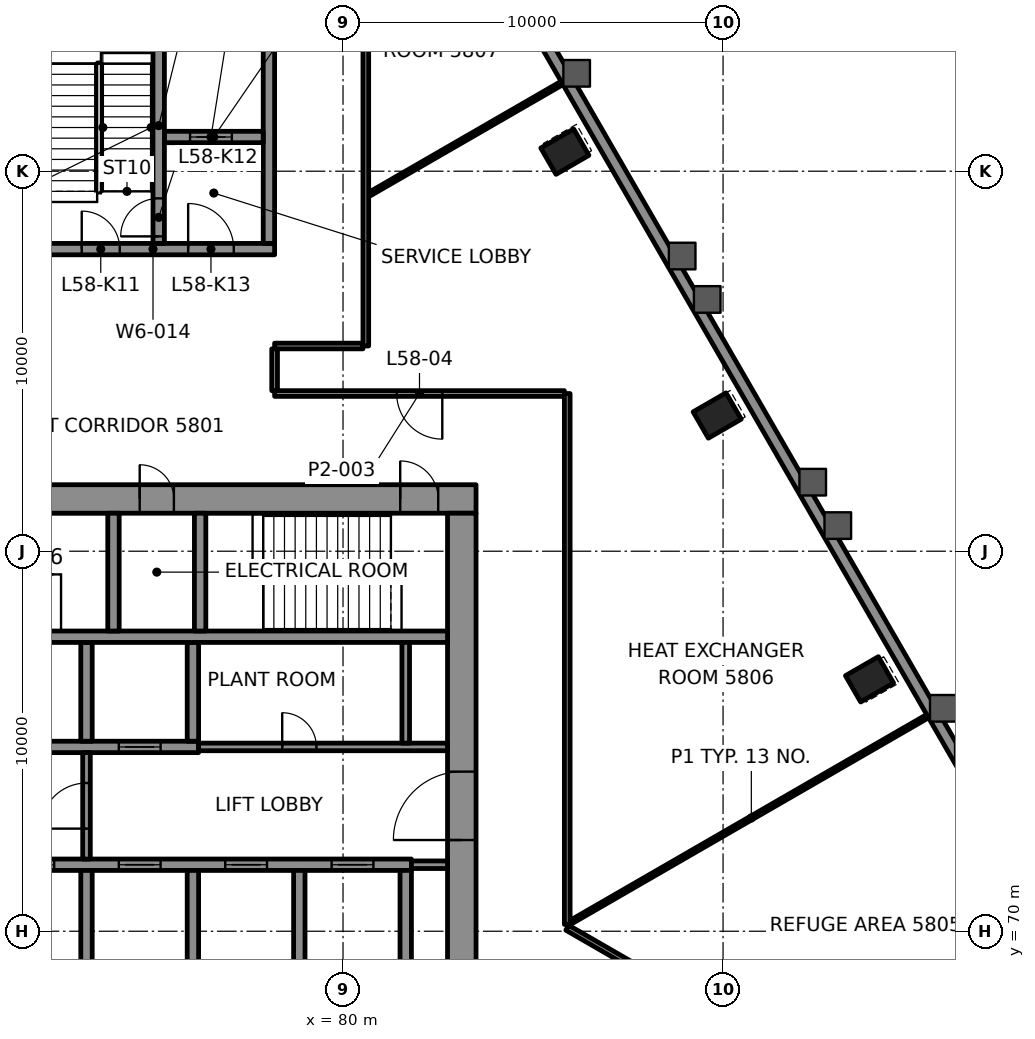
"""IFC4 building model, lengths in metres.
Left out: names, types, materials, properties, quantities, classifications, styles, units other than length and angle.
Written with IfcOpenShell. Run it as: python <this file> out.ifc"""

import sys

from ifc_helpers import new_model, si_unit, direction, frame, frame_2d, origin, origin_2d, place, context, subcontext, project, spatial, rectangle, hollow_rectangle, extrude, element, fill, save


model = new_model("IFC4")
c1 = context("Model", 3, precision=1e-05, world=origin(), true_north=direction((0.0, 1.0)))
c2 = subcontext(c1, "Body", "Model", "MODEL_VIEW")
j1 = project(units=[si_unit("LENGTHUNIT", "METRE"), si_unit("PLANEANGLEUNIT", "RADIAN")], contexts=[c1])
p1 = place(None, origin())
s1 = spatial("IfcSite", under=j1, at=p1, CompositionType="ELEMENT")
p2 = place(p1, origin())
s2 = spatial("IfcBuilding", under=s1, at=p2, CompositionType="ELEMENT")
p3 = place(p2, frame((0.0, 0.0, 247.6)))
s3 = spatial("IfcBuildingStorey", under=s2, at=p3, CompositionType="ELEMENT", Elevation=247.6)
for number, where, z_axis, x_axis in (
    (1, (93.854, 76.628, -0.0), (0.0, 0.0, 1.0), (-0.5, 0.866, 0.0)),
    (2, (89.845, 83.571, -0.0), (0.0, 0.0, 1.0), (-0.5, 0.866, 0.0)),
    (3, (85.837, 90.514, -0.0), (0.0, 0.0, 1.0), (-0.5, 0.866, 0.0)),
):
    element("IfcColumn", number, at=place(p3, frame(where, z_axis=z_axis, x_axis=x_axis)), inside=s3, PredefinedType="COLUMN", context=c2, shape_type="SweptSolid", body=[
        extrude(hollow_rectangle(XDim=0.8, YDim=1.0, WallThickness=0.05, at=origin_2d()), origin(), (0.0, 0.0, 1.0), 4.5),
    ])
p4 = place(p3, frame((66.5, 81.375, 0.0), z_axis=(0.0, 0.0, 1.0), x_axis=(1.0, 0.0, 0.0)))
e4 = element("IfcWall", 4, at=p4, inside=s3, PredefinedType="SHEAR", context=c2, shape_type="SweptSolid", body=[
    extrude(rectangle(XDim=17.0, YDim=0.75, at=frame_2d((8.5, 0.0))), origin(), (0.0, 0.0, 1.0), 4.05),
])
p5 = place(p4, frame((1.195, 0.0, 0.0)))
e5 = element("IfcOpeningElement", 5, at=p5, cuts=e4, PredefinedType="OPENING", context=c2, shape_type="SweptSolid", body=[
    extrude(rectangle(XDim=1.0, YDim=2.1, at=frame_2d((0.5, 1.05))), frame((0.0, 0.385, 0.0), z_axis=(0.0, -1.0, 0.0), x_axis=(1.0, 0.0, 0.0)), (0.0, 0.0, 1.0), 0.77),
])
p6 = place(p4, frame((15.005, 0.0, 0.0)))
e6 = element("IfcOpeningElement", 6, at=p6, cuts=e4, PredefinedType="OPENING", context=c2, shape_type="SweptSolid", body=[
    extrude(rectangle(XDim=1.0, YDim=2.1, at=frame_2d((0.5, 1.05))), frame((0.0, 0.385, 0.0), z_axis=(0.0, -1.0, 0.0), x_axis=(1.0, 0.0, 0.0)), (0.0, 0.0, 1.0), 0.77),
])
p7 = place(p4, frame((8.15, 0.0, 0.0)))
e7 = element("IfcOpeningElement", 7, at=p7, cuts=e4, PredefinedType="OPENING", context=c2, shape_type="SweptSolid", body=[
    extrude(rectangle(XDim=0.9, YDim=2.1, at=frame_2d((0.45, 1.05))), frame((0.0, 0.385, 0.0), z_axis=(0.0, -1.0, 0.0), x_axis=(1.0, 0.0, 0.0)), (0.0, 0.0, 1.0), 0.77),
])
p8 = place(p3, frame((83.125, 69.0, 0.0), z_axis=(0.0, 0.0, 1.0), x_axis=(0.0, 1.0, 0.0)))
e8 = element("IfcWall", 8, at=p8, inside=s3, PredefinedType="SHEAR", context=c2, shape_type="SweptSolid", body=[
    extrude(rectangle(XDim=12.0, YDim=0.75, at=frame_2d((6.0, 0.0))), origin(), (0.0, 0.0, 1.0), 4.05),
])
p9 = place(p8, frame((3.4, 0.0, 0.0)))
e9 = element("IfcOpeningElement", 9, at=p9, cuts=e8, PredefinedType="OPENING", context=c2, shape_type="SweptSolid", body=[
    extrude(rectangle(XDim=1.8, YDim=2.1, at=frame_2d((0.9, 1.05))), frame((0.0, 0.385, 0.0), z_axis=(0.0, -1.0, 0.0), x_axis=(1.0, 0.0, 0.0)), (0.0, 0.0, 1.0), 0.77),
])
p10 = place(p3, frame((70.3, 71.75, 0.0), z_axis=(0.0, 0.0, 1.0), x_axis=(1.0, 0.0, 0.0)))
e10 = element("IfcWall", 10, at=p10, inside=s3, PredefinedType="SHEAR", context=c2, shape_type="SweptSolid", body=[
    extrude(rectangle(XDim=11.5, YDim=0.3, at=frame_2d((5.75, 0.0))), origin(), (0.0, 0.0, 1.0), 4.05),
])
p11 = place(p10, frame((1.0, 0.0, 0.0)))
e11 = element("IfcOpeningElement", 11, at=p11, cuts=e10, PredefinedType="OPENING", context=c2, shape_type="SweptSolid", body=[
    extrude(rectangle(XDim=1.1, YDim=2.1, at=frame_2d((0.55, 1.05))), frame((0.0, 0.16, 0.0), z_axis=(0.0, -1.0, 0.0), x_axis=(1.0, 0.0, 0.0)), (0.0, 0.0, 1.0), 0.32),
])
p12 = place(p10, frame((3.8, 0.0, 0.0)))
e12 = element("IfcOpeningElement", 12, at=p12, cuts=e10, PredefinedType="OPENING", context=c2, shape_type="SweptSolid", body=[
    extrude(rectangle(XDim=1.1, YDim=2.1, at=frame_2d((0.55, 1.05))), frame((0.0, 0.16, 0.0), z_axis=(0.0, -1.0, 0.0), x_axis=(1.0, 0.0, 0.0)), (0.0, 0.0, 1.0), 0.32),
])
p13 = place(p10, frame((6.6, 0.0, 0.0)))
e13 = element("IfcOpeningElement", 13, at=p13, cuts=e10, PredefinedType="OPENING", context=c2, shape_type="SweptSolid", body=[
    extrude(rectangle(XDim=1.1, YDim=2.1, at=frame_2d((0.55, 1.05))), frame((0.0, 0.16, 0.0), z_axis=(0.0, -1.0, 0.0), x_axis=(1.0, 0.0, 0.0)), (0.0, 0.0, 1.0), 0.32),
])
p14 = place(p10, frame((9.4, 0.0, 0.0)))
e14 = element("IfcOpeningElement", 14, at=p14, cuts=e10, PredefinedType="OPENING", context=c2, shape_type="SweptSolid", body=[
    extrude(rectangle(XDim=1.1, YDim=2.1, at=frame_2d((0.55, 1.05))), frame((0.0, 0.16, 0.0), z_axis=(0.0, -1.0, 0.0), x_axis=(1.0, 0.0, 0.0)), (0.0, 0.0, 1.0), 0.32),
])
p15 = place(p3, frame((70.3, 74.85, 0.0), z_axis=(0.0, 0.0, 1.0), x_axis=(1.0, 0.0, 0.0)))
e15 = element("IfcWall", 15, at=p15, inside=s3, PredefinedType="SHEAR", context=c2, shape_type="SweptSolid", body=[
    extrude(rectangle(XDim=5.9, YDim=0.3, at=frame_2d((2.95, 0.0))), origin(), (0.0, 0.0, 1.0), 4.05),
])
p16 = place(p15, frame((3.8, 0.0, 0.0)))
e16 = element("IfcOpeningElement", 16, at=p16, cuts=e15, PredefinedType="OPENING", context=c2, shape_type="SweptSolid", body=[
    extrude(rectangle(XDim=1.1, YDim=2.1, at=frame_2d((0.55, 1.05))), frame((0.0, 0.16, 0.0), z_axis=(0.0, -1.0, 0.0), x_axis=(1.0, 0.0, 0.0)), (0.0, 0.0, 1.0), 0.32),
])
for number, where, z_axis, x_axis in (
    (17, (73.25, 69.0, 0.0), (0.0, 0.0, 1.0), (0.0, 1.0, 0.0)),
    (18, (73.25, 75.0, 0.0), (0.0, 0.0, 1.0), (0.0, 1.0, 0.0)),
    (19, (76.05, 69.0, 0.0), (0.0, 0.0, 1.0), (0.0, 1.0, 0.0)),
    (20, (76.05, 75.0, 0.0), (0.0, 0.0, 1.0), (0.0, 1.0, 0.0)),
    (21, (78.85, 69.0, 0.0), (0.0, 0.0, 1.0), (0.0, 1.0, 0.0)),
    (22, (81.65, 69.0, 0.0), (0.0, 0.0, 1.0), (0.0, 1.0, 0.0)),
):
    element("IfcWall", number, at=place(p3, frame(where, z_axis=z_axis, x_axis=x_axis)), inside=s3, PredefinedType="SHEAR", context=c2, shape_type="SweptSolid", body=[
        extrude(rectangle(XDim=2.6, YDim=0.3, at=frame_2d((1.3, 0.0))), origin(), (0.0, 0.0, 1.0), 4.05),
    ])
p17 = place(p3, frame((67.25, 77.75, 0.0), z_axis=(0.0, 0.0, 1.0), x_axis=(1.0, 0.0, 0.0)))
e23 = element("IfcWall", 23, at=p17, inside=s3, PredefinedType="SHEAR", context=c2, shape_type="SweptSolid", body=[
    extrude(rectangle(XDim=15.5, YDim=0.3, at=frame_2d((7.75, 0.0))), origin(), (0.0, 0.0, 1.0), 4.05),
])
p18 = place(p17, frame((0.445, 0.0, 0.0)))
e24 = element("IfcOpeningElement", 24, at=p18, cuts=e23, PredefinedType="OPENING", context=c2, shape_type="SweptSolid", body=[
    extrude(rectangle(XDim=1.0, YDim=2.1, at=frame_2d((0.5, 1.05))), frame((0.0, 0.16, 0.0), z_axis=(0.0, -1.0, 0.0), x_axis=(1.0, 0.0, 0.0)), (0.0, 0.0, 1.0), 0.32),
])
for number, where, z_axis, x_axis in (
    (25, (73.96, 77.9, 0.0), (0.0, 0.0, 1.0), (0.0, 1.0, 0.0)),
    (26, (76.24, 77.9, 0.0), (0.0, 0.0, 1.0), (0.0, 1.0, 0.0)),
):
    element("IfcWall", number, at=place(p3, frame(where, z_axis=z_axis, x_axis=x_axis)), inside=s3, PredefinedType="SHEAR", context=c2, shape_type="SweptSolid", body=[
        extrude(rectangle(XDim=3.1, YDim=0.3, at=frame_2d((1.55, 0.0))), origin(), (0.0, 0.0, 1.0), 4.05),
    ])
p19 = place(p3, frame((71.8, 87.95, 0.0), z_axis=(0.0, 0.0, 1.0), x_axis=(1.0, 0.0, 0.0)))
e27 = element("IfcWall", 27, at=p19, inside=s3, PredefinedType="SHEAR", context=c2, shape_type="SweptSolid", body=[
    extrude(rectangle(XDim=6.4, YDim=0.3, at=frame_2d((3.2, 0.0))), origin(), (0.0, 0.0, 1.0), 4.05),
])
p20 = place(p19, frame((1.325, 0.0, 0.0)))
e28 = element("IfcOpeningElement", 28, at=p20, cuts=e27, PredefinedType="OPENING", context=c2, shape_type="SweptSolid", body=[
    extrude(rectangle(XDim=1.0, YDim=2.1, at=frame_2d((0.5, 1.05))), frame((0.0, 0.16, 0.0), z_axis=(0.0, -1.0, 0.0), x_axis=(1.0, 0.0, 0.0)), (0.0, 0.0, 1.0), 0.32),
])
p21 = place(p19, frame((4.125, 0.0, 0.0)))
e29 = element("IfcOpeningElement", 29, at=p21, cuts=e27, PredefinedType="OPENING", context=c2, shape_type="SweptSolid", body=[
    extrude(rectangle(XDim=1.2, YDim=2.1, at=frame_2d((0.6, 1.05))), frame((0.0, 0.16, 0.0), z_axis=(0.0, -1.0, 0.0), x_axis=(1.0, 0.0, 0.0)), (0.0, 0.0, 1.0), 0.32),
])
p22 = place(p3, frame((78.05, 88.1, 0.0), z_axis=(0.0, 0.0, 1.0), x_axis=(0.0, 1.0, 0.0)))
e30 = element("IfcWall", 30, at=p22, inside=s3, PredefinedType="SHEAR", context=c2, shape_type="SweptSolid", body=[
    extrude(rectangle(XDim=6.2, YDim=0.3, at=frame_2d((3.1, 0.0))), origin(), (0.0, 0.0, 1.0), 4.05),
])
p23 = place(p3, frame((75.3, 90.9, 0.0), z_axis=(0.0, 0.0, 1.0), x_axis=(1.0, 0.0, 0.0)))
e31 = element("IfcWall", 31, at=p23, inside=s3, PredefinedType="SHEAR", context=c2, shape_type="SweptSolid", body=[
    extrude(rectangle(XDim=2.6, YDim=0.3, at=frame_2d((1.3, 0.0))), origin(), (0.0, 0.0, 1.0), 4.05),
])
p24 = place(p23, frame((0.675, 0.0, 0.0)))
e32 = element("IfcOpeningElement", 32, at=p24, cuts=e31, PredefinedType="OPENING", context=c2, shape_type="SweptSolid", body=[
    extrude(rectangle(XDim=1.1, YDim=2.1, at=frame_2d((0.55, 1.05))), frame((0.0, 0.16, 0.0), z_axis=(0.0, -1.0, 0.0), x_axis=(1.0, 0.0, 0.0)), (0.0, 0.0, 1.0), 0.32),
])
p25 = place(p3, frame((75.15, 88.1, 0.0), z_axis=(0.0, 0.0, 1.0), x_axis=(0.0, 1.0, 0.0)))
e33 = element("IfcWall", 33, at=p25, inside=s3, PredefinedType="SHEAR", context=c2, shape_type="SweptSolid", body=[
    extrude(rectangle(XDim=6.2, YDim=0.3, at=frame_2d((3.1, 0.0))), origin(), (0.0, 0.0, 1.0), 4.05),
])
p26 = place(p25, frame((0.185, 0.0, 0.0)))
e34 = element("IfcOpeningElement", 34, at=p26, cuts=e33, PredefinedType="OPENING", context=c2, shape_type="SweptSolid", body=[
    extrude(rectangle(XDim=1.0, YDim=2.1, at=frame_2d((0.5, 1.05))), frame((0.0, 0.16, 0.0), z_axis=(0.0, -1.0, 0.0), x_axis=(1.0, 0.0, 0.0)), (0.0, 0.0, 1.0), 0.32),
])
p27 = place(p3, frame((85.824, 84.15, 0.0), z_axis=(0.0, 0.0, 1.0), x_axis=(-1.0, 0.0, 0.0)))
e35 = element("IfcWall", 35, at=p27, inside=s3, PredefinedType="PARTITIONING", context=c2, shape_type="SweptSolid", body=[
    extrude(rectangle(XDim=7.625, YDim=0.15, at=frame_2d((3.812, 0.0))), origin(), (0.0, 0.0, 1.0), 3.447),
])
p28 = place(p27, frame((3.212, 0.0, 0.0)))
e36 = element("IfcOpeningElement", 36, at=p28, cuts=e35, PredefinedType="OPENING", context=c2, shape_type="SweptSolid", body=[
    extrude(rectangle(XDim=1.2, YDim=2.1, at=frame_2d((0.6, 1.05))), frame((0.0, 0.085, 0.0), z_axis=(0.0, -1.0, 0.0), x_axis=(1.0, 0.0, 0.0)), (0.0, 0.0, 1.0), 0.17),
])
p29 = place(p3, frame((78.2, 85.4, 0.0), z_axis=(0.0, 0.0, 1.0), x_axis=(1.0, 0.0, 0.0)))
e37 = element("IfcWall", 37, at=p29, inside=s3, PredefinedType="PARTITIONING", context=c2, shape_type="SweptSolid", body=[
    extrude(rectangle(XDim=2.324, YDim=0.15, at=frame_2d((1.162, 0.0))), origin(), (0.0, 0.0, 1.0), 3.447),
])
p30 = place(p3, frame((86.001, 70.243, 0.0), z_axis=(0.0, 0.0, 1.0), x_axis=(0.866028949349, 0.499993858851, 0.0)))
e38 = element("IfcWall", 38, at=p30, inside=s3, PredefinedType="PARTITIONING", context=c2, shape_type="SweptSolid", body=[
    extrude(rectangle(XDim=10.953, YDim=0.1, at=frame_2d((5.477, 0.0))), origin(), (0.0, 0.0, 1.0), 3.372),
])
p31 = place(p3, frame((80.701, 89.4, 0.0), z_axis=(0.0, 0.0, 1.0), x_axis=(0.866020648857, 0.500008235685, 0.0)))
e39 = element("IfcWall", 39, at=p31, inside=s3, PredefinedType="PARTITIONING", context=c2, shape_type="SweptSolid", body=[
    extrude(rectangle(XDim=5.965, YDim=0.1, at=frame_2d((2.983, 0.0))), origin(), (0.0, 0.0, 1.0), 3.372),
])
p32 = place(p3, frame((85.9, 70.179, 0.0), z_axis=(0.0, 0.0, 1.0), x_axis=(0.0, 1.0, 0.0)))
e40 = element("IfcWall", 40, at=p32, inside=s3, PredefinedType="PARTITIONING", context=c2, shape_type="SweptSolid", body=[
    extrude(rectangle(XDim=13.97, YDim=0.15, at=frame_2d((6.985, 0.0))), origin(), (0.0, 0.0, 1.0), 3.45),
])
p33 = place(p3, frame((80.6, 85.401, 0.0), z_axis=(0.0, 0.0, 1.0), x_axis=(0.0, 1.0, 0.0)))
e41 = element("IfcWall", 41, at=p33, inside=s3, PredefinedType="PARTITIONING", context=c2, shape_type="SweptSolid", body=[
    extrude(rectangle(XDim=11.599, YDim=0.15, at=frame_2d((5.799, 0.0))), origin(), (0.0, 0.0, 1.0), 3.447),
])
p34 = place(p3, frame((78.2, 84.225, 0.0), z_axis=(0.0, 0.0, 1.0), x_axis=(0.0, 1.0, 0.0)))
e42 = element("IfcWall", 42, at=p34, inside=s3, PredefinedType="PARTITIONING", context=c2, shape_type="SweptSolid", body=[
    extrude(rectangle(XDim=1.1, YDim=0.15, at=frame_2d((0.55, 0.0))), origin(), (0.0, 0.0, 1.0), 3.447),
])
p35 = place(p3, frame((85.9, 70.093, 0.0), z_axis=(0.0, 0.0, 1.0), x_axis=(0.86602437476, -0.500001782318, 0.0)))
e43 = element("IfcWall", 43, at=p35, inside=s3, PredefinedType="PARTITIONING", context=c2, shape_type="SweptSolid", body=[
    extrude(rectangle(XDim=14.955, YDim=0.15, at=frame_2d((7.478, 0.0))), origin(), (0.0, 0.0, 1.0), 3.45),
])
p36 = place(p35, frame((7.028, 0.0, 0.0)))
e44 = element("IfcOpeningElement", 44, at=p36, cuts=e43, PredefinedType="OPENING", context=c2, shape_type="SweptSolid", body=[
    extrude(rectangle(XDim=0.9, YDim=2.1, at=frame_2d((0.45, 1.05))), frame((0.0, 0.085, 0.0), z_axis=(0.0, -1.0, 0.0), x_axis=(1.0, 0.0, 0.0)), (0.0, 0.0, 1.0), 0.17),
])
p37 = place(p3, frame((102.754, 63.193, 0.0), z_axis=(0.0, 0.0, 1.0), x_axis=(-0.500001140025, 0.866024745589, 0.0)))
e45 = element("IfcWall", 45, at=p37, inside=s3, PredefinedType="SOLIDWALL", context=c2, shape_type="SweptSolid", body=[
    extrude(rectangle(XDim=48.204, YDim=0.3, at=frame_2d((24.102, 0.0))), origin(), (0.0, 0.0, 1.0), 4.05),
])
p38 = place(p3, frame((81.8, 71.75, 0.0), z_axis=(0.0, 0.0, 1.0), x_axis=(1.0, 0.0, 0.0)))
e46 = element("IfcWall", 46, at=p38, inside=s3, PredefinedType="PARTITIONING", context=c2, shape_type="SweptSolid", body=[
    extrude(rectangle(XDim=0.95, YDim=0.2, at=frame_2d((0.475, 0.0))), origin(), (0.0, 0.0, 1.0), 4.05),
])
p39 = place(p3, frame((76.2, 74.85, 0.0), z_axis=(0.0, 0.0, 1.0), x_axis=(1.0, 0.0, 0.0)))
e47 = element("IfcWall", 47, at=p39, inside=s3, PredefinedType="PARTITIONING", context=c2, shape_type="SweptSolid", body=[
    extrude(rectangle(XDim=6.55, YDim=0.2, at=frame_2d((3.275, 0.0))), origin(), (0.0, 0.0, 1.0), 4.05),
])
p40 = place(p39, frame((2.2, 0.0, 0.0)))
e48 = element("IfcOpeningElement", 48, at=p40, cuts=e47, PredefinedType="OPENING", context=c2, shape_type="SweptSolid", body=[
    extrude(rectangle(XDim=0.9, YDim=2.1, at=frame_2d((0.45, 1.05))), frame((0.0, 0.11, 0.0), z_axis=(0.0, -1.0, 0.0), x_axis=(1.0, 0.0, 0.0)), (0.0, 0.0, 1.0), 0.22),
])
p41 = place(p3, frame((73.25, 71.9, 0.0), z_axis=(0.0, 0.0, 1.0), x_axis=(0.0, 1.0, 0.0)))
e49 = element("IfcWall", 49, at=p41, inside=s3, PredefinedType="PARTITIONING", context=c2, shape_type="SweptSolid", body=[
    extrude(rectangle(XDim=2.8, YDim=0.2, at=frame_2d((1.4, 0.0))), origin(), (0.0, 0.0, 1.0), 4.05),
])
p42 = place(p41, frame((0.8, 0.0, 0.0)))
e50 = element("IfcOpeningElement", 50, at=p42, cuts=e49, PredefinedType="OPENING", context=c2, shape_type="SweptSolid", body=[
    extrude(rectangle(XDim=1.2, YDim=2.1, at=frame_2d((0.6, 1.05))), frame((0.0, 0.11, 0.0), z_axis=(0.0, -1.0, 0.0), x_axis=(1.0, 0.0, 0.0)), (0.0, 0.0, 1.0), 0.22),
])
p43 = place(p3, frame((81.65, 74.95, 0.0), z_axis=(0.0, 0.0, 1.0), x_axis=(0.0, 1.0, 0.0)))
e51 = element("IfcWall", 51, at=p43, inside=s3, PredefinedType="PARTITIONING", context=c2, shape_type="SweptSolid", body=[
    extrude(rectangle(XDim=2.65, YDim=0.2, at=frame_2d((1.325, 0.0))), origin(), (0.0, 0.0, 1.0), 4.05),
])
p44 = place(p28, origin())
e52 = element("IfcDoor", 52, at=p44, inside=s3, OperationType="DOUBLE_DOOR_SINGLE_SWING", PredefinedType="DOOR", context=c2, shape_type="SweptSolid", body=[
    extrude(rectangle(XDim=1.2, YDim=2.1, at=frame_2d((0.6, 1.05))), frame((0.0, 0.025, 0.0), z_axis=(0.0, -1.0, 0.0), x_axis=(1.0, 0.0, 0.0)), (0.0, 0.0, 1.0), 0.05),
])
fill(e36, e52)
p45 = place(p11, origin())
e53 = element("IfcDoor", 53, at=p45, inside=s3, OperationType="DOUBLE_DOOR_SLIDING", PredefinedType="DOOR", context=c2, shape_type="SweptSolid", body=[
    extrude(rectangle(XDim=1.1, YDim=2.1, at=frame_2d((0.55, 1.05))), frame((0.0, 0.025, 0.0), z_axis=(0.0, -1.0, 0.0), x_axis=(1.0, 0.0, 0.0)), (0.0, 0.0, 1.0), 0.05),
])
fill(e11, e53)
p46 = place(p12, origin())
e54 = element("IfcDoor", 54, at=p46, inside=s3, OperationType="DOUBLE_DOOR_SLIDING", PredefinedType="DOOR", context=c2, shape_type="SweptSolid", body=[
    extrude(rectangle(XDim=1.1, YDim=2.1, at=frame_2d((0.55, 1.05))), frame((0.0, 0.025, 0.0), z_axis=(0.0, -1.0, 0.0), x_axis=(1.0, 0.0, 0.0)), (0.0, 0.0, 1.0), 0.05),
])
fill(e12, e54)
p47 = place(p13, origin())
e55 = element("IfcDoor", 55, at=p47, inside=s3, OperationType="DOUBLE_DOOR_SLIDING", PredefinedType="DOOR", context=c2, shape_type="SweptSolid", body=[
    extrude(rectangle(XDim=1.1, YDim=2.1, at=frame_2d((0.55, 1.05))), frame((0.0, 0.025, 0.0), z_axis=(0.0, -1.0, 0.0), x_axis=(1.0, 0.0, 0.0)), (0.0, 0.0, 1.0), 0.05),
])
fill(e13, e55)
p48 = place(p14, origin())
e56 = element("IfcDoor", 56, at=p48, inside=s3, OperationType="DOUBLE_DOOR_SLIDING", PredefinedType="DOOR", context=c2, shape_type="SweptSolid", body=[
    extrude(rectangle(XDim=1.1, YDim=2.1, at=frame_2d((0.55, 1.05))), frame((0.0, 0.025, 0.0), z_axis=(0.0, -1.0, 0.0), x_axis=(1.0, 0.0, 0.0)), (0.0, 0.0, 1.0), 0.05),
])
fill(e14, e56)
p49 = place(p16, origin())
e57 = element("IfcDoor", 57, at=p49, inside=s3, OperationType="DOUBLE_DOOR_SLIDING", PredefinedType="DOOR", context=c2, shape_type="SweptSolid", body=[
    extrude(rectangle(XDim=1.1, YDim=2.1, at=frame_2d((0.55, 1.05))), frame((0.0, 0.025, 0.0), z_axis=(0.0, -1.0, 0.0), x_axis=(1.0, 0.0, 0.0)), (0.0, 0.0, 1.0), 0.05),
])
fill(e16, e57)
p50 = place(p24, origin())
e58 = element("IfcDoor", 58, at=p50, inside=s3, OperationType="DOUBLE_DOOR_SLIDING", PredefinedType="DOOR", context=c2, shape_type="SweptSolid", body=[
    extrude(rectangle(XDim=1.1, YDim=2.1, at=frame_2d((0.55, 1.05))), frame((0.0, 0.025, 0.0), z_axis=(0.0, -1.0, 0.0), x_axis=(1.0, 0.0, 0.0)), (0.0, 0.0, 1.0), 0.05),
])
fill(e32, e58)
p51 = place(p6, origin())
e59 = element("IfcDoor", 59, at=p51, inside=s3, OperationType="SINGLE_SWING_LEFT", PredefinedType="DOOR", context=c2, shape_type="SweptSolid", body=[
    extrude(rectangle(XDim=1.0, YDim=2.1, at=frame_2d((0.5, 1.05))), frame((0.0, 0.095, 0.0), z_axis=(0.0, -1.0, 0.0), x_axis=(1.0, 0.0, 0.0)), (0.0, 0.0, 1.0), 0.19),
])
fill(e6, e59)
p52 = place(p20, origin())
e60 = element("IfcDoor", 60, at=p52, inside=s3, OperationType="SINGLE_SWING_RIGHT", PredefinedType="DOOR", context=c2, shape_type="SweptSolid", body=[
    extrude(rectangle(XDim=1.0, YDim=2.1, at=frame_2d((0.5, 1.05))), frame((0.0, 0.025, 0.0), z_axis=(0.0, -1.0, 0.0), x_axis=(1.0, 0.0, 0.0)), (0.0, 0.0, 1.0), 0.05),
])
fill(e28, e60)
p53 = place(p26, origin())
e61 = element("IfcDoor", 61, at=p53, inside=s3, OperationType="SINGLE_SWING_LEFT", PredefinedType="DOOR", context=c2, shape_type="SweptSolid", body=[
    extrude(rectangle(XDim=1.0, YDim=2.1, at=frame_2d((0.5, 1.05))), frame((0.0, 0.025, 0.0), z_axis=(0.0, -1.0, 0.0), x_axis=(1.0, 0.0, 0.0)), (0.0, 0.0, 1.0), 0.05),
])
fill(e34, e61)
p54 = place(p21, origin())
e62 = element("IfcDoor", 62, at=p54, inside=s3, OperationType="SINGLE_SWING_RIGHT", PredefinedType="DOOR", context=c2, shape_type="SweptSolid", body=[
    extrude(rectangle(XDim=1.2, YDim=2.1, at=frame_2d((0.6, 1.05))), frame((0.0, 0.025, 0.0), z_axis=(0.0, -1.0, 0.0), x_axis=(1.0, 0.0, 0.0)), (0.0, 0.0, 1.0), 0.05),
])
fill(e29, e62)
p55 = place(p42, origin())
e63 = element("IfcDoor", 63, at=p55, inside=s3, OperationType="SINGLE_SWING_LEFT", PredefinedType="DOOR", context=c2, shape_type="SweptSolid", body=[
    extrude(rectangle(XDim=1.2, YDim=2.1, at=frame_2d((0.6, 1.05))), frame((0.0, 0.025, 0.0), z_axis=(0.0, -1.0, 0.0), x_axis=(1.0, 0.0, 0.0)), (0.0, 0.0, 1.0), 0.05),
])
fill(e50, e63)
p56 = place(p9, origin())
e64 = element("IfcDoor", 64, at=p56, inside=s3, OperationType="SINGLE_SWING_LEFT", PredefinedType="DOOR", context=c2, shape_type="SweptSolid", body=[
    extrude(rectangle(XDim=1.8, YDim=2.1, at=frame_2d((0.9, 1.05))), frame((0.0, 0.095, 0.0), z_axis=(0.0, -1.0, 0.0), x_axis=(1.0, 0.0, 0.0)), (0.0, 0.0, 1.0), 0.19),
])
fill(e9, e64)
p57 = place(p40, origin())
e65 = element("IfcDoor", 65, at=p57, inside=s3, OperationType="SINGLE_SWING_LEFT", PredefinedType="DOOR", context=c2, shape_type="SweptSolid", body=[
    extrude(rectangle(XDim=0.9, YDim=2.1, at=frame_2d((0.45, 1.05))), frame((0.0, 0.025, 0.0), z_axis=(0.0, -1.0, 0.0), x_axis=(1.0, 0.0, 0.0)), (0.0, 0.0, 1.0), 0.05),
])
fill(e48, e65)
p58 = place(p7, origin())
e66 = element("IfcDoor", 66, at=p58, inside=s3, OperationType="SINGLE_SWING_RIGHT", PredefinedType="DOOR", context=c2, shape_type="SweptSolid", body=[
    extrude(rectangle(XDim=0.9, YDim=2.1, at=frame_2d((0.45, 1.05))), frame((0.0, 0.095, 0.0), z_axis=(0.0, -1.0, 0.0), x_axis=(1.0, 0.0, 0.0)), (0.0, 0.0, 1.0), 0.19),
])
fill(e7, e66)
save(model, sys.argv[1])
